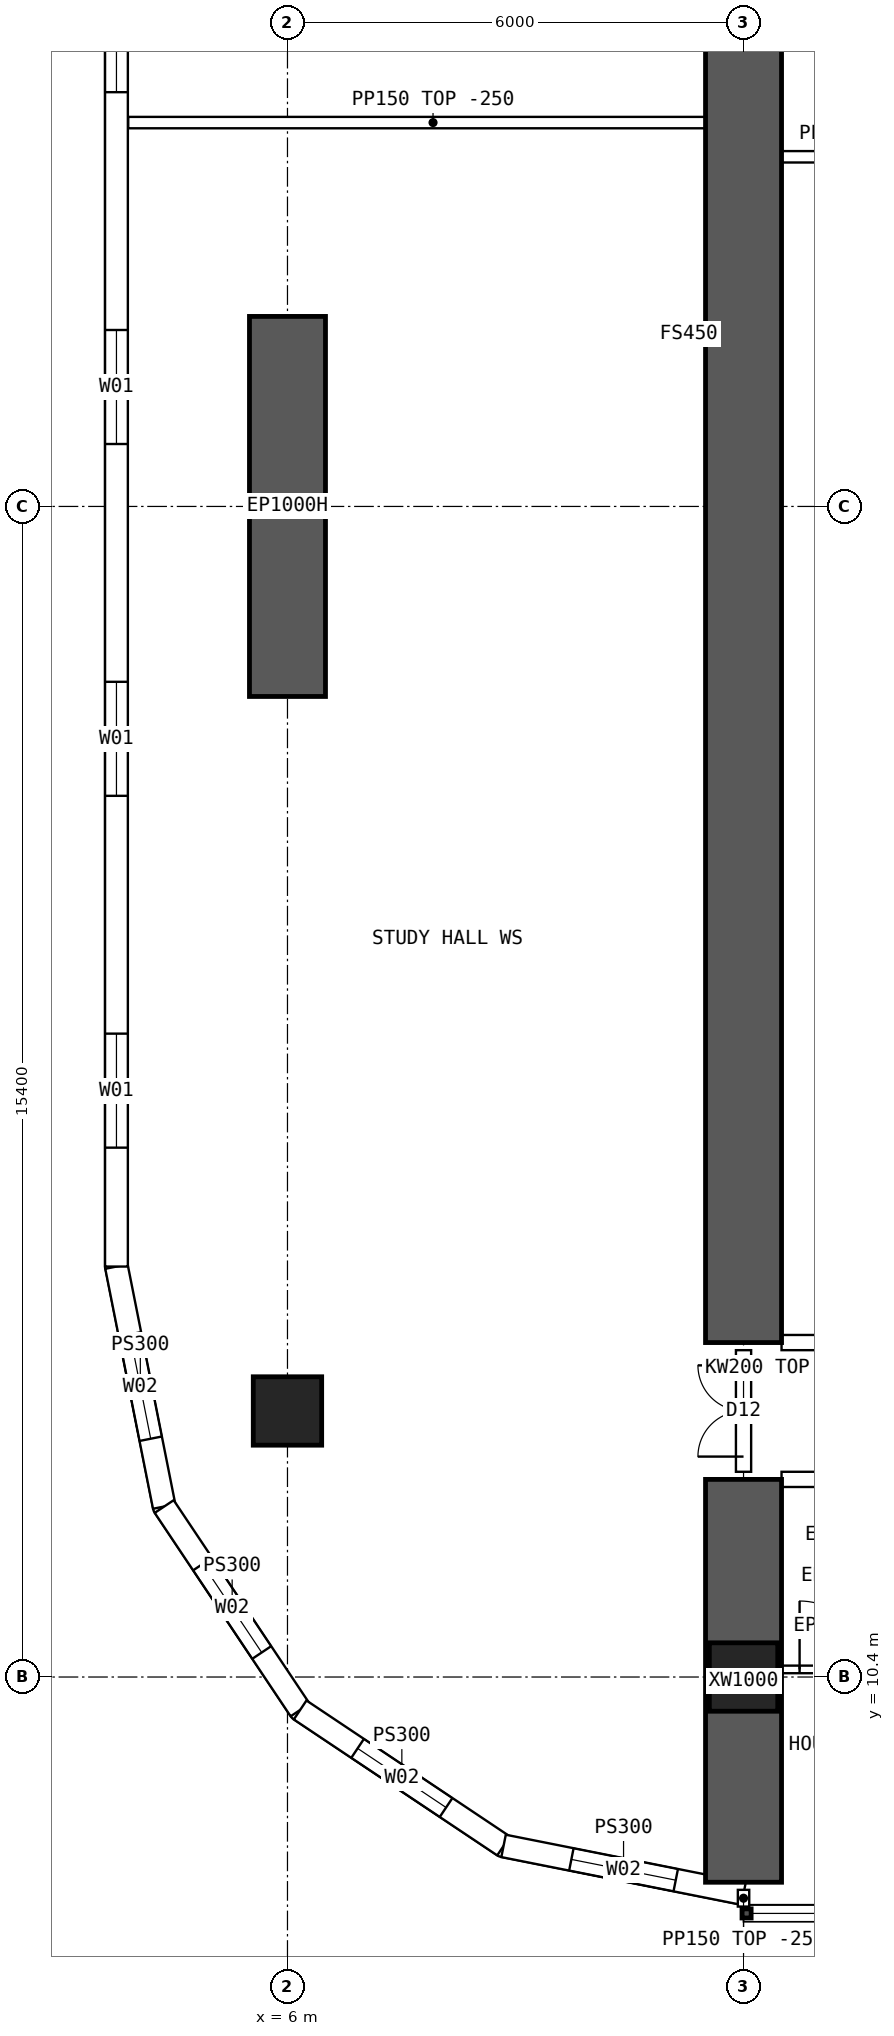
"""IFC4 building model, lengths in metres.
Left out: names, types, materials, properties, quantities, classifications, styles, units other than length and angle.
Written with IfcOpenShell. Run it as: python <this file> out.ifc"""

import sys

from ifc_helpers import new_model, si_unit, direction, frame, frame_2d, origin, origin_2d, place, context, subcontext, project, spatial, polyline, rectangle, hollow_rectangle, outline, extrude, element, fill, save


model = new_model("IFC4")
c1 = context("Model", 3, precision=1e-05, world=origin(), true_north=direction((0.0, 1.0)))
c2 = subcontext(c1, "Body", "Model", "MODEL_VIEW")
j1 = project(units=[si_unit("LENGTHUNIT", "METRE"), si_unit("PLANEANGLEUNIT", "RADIAN")], contexts=[c1])
p1 = place(None, origin())
s1 = spatial("IfcSite", under=j1, at=p1, CompositionType="ELEMENT")
p2 = place(p1, origin())
s2 = spatial("IfcBuilding", under=s1, at=p2, CompositionType="ELEMENT")
p3 = place(p2, frame((0.0, 0.0, 23.95)))
s3 = spatial("IfcBuildingStorey", under=s2, at=p3, CompositionType="ELEMENT", Elevation=23.95)
for number, where, z_axis, x_axis in (
    (1, (12.0, 10.4, 0.0), (0.0, 0.0, 1.0), (1.0, 0.0, 0.0)),
    (2, (6.0, 13.9, 0.0), (0.0, 0.0, 1.0), (1.0, 0.0, 0.0)),
):
    element("IfcColumn", number, at=place(p3, frame(where, z_axis=z_axis, x_axis=x_axis)), inside=s3, PredefinedType="COLUMN", context=c2, shape_type="SweptSolid", body=[
        extrude(hollow_rectangle(XDim=0.9, YDim=0.9, WallThickness=0.09, at=origin_2d()), origin(), (0.0, 0.0, 1.0), 3.75),
    ])
p4 = place(p3, frame((6.0, 23.3, 0.0), z_axis=(0.0, 0.0, 1.0), x_axis=(0.0, 1.0, 0.0)))
e3 = element("IfcWall", 3, at=p4, inside=s3, PredefinedType="SHEAR", context=c2, shape_type="SweptSolid", body=[
    extrude(rectangle(XDim=5.0, YDim=1.0, at=frame_2d((2.5, 0.0))), origin(), (0.0, 0.0, 1.0), 3.75),
])
p5 = place(p3, frame((12.0, 7.7, 0.0), z_axis=(0.0, 0.0, 1.0), x_axis=(0.0, 1.0, 0.0)))
e4 = element("IfcWall", 4, at=p5, inside=s3, PredefinedType="SHEAR", context=c2, shape_type="SweptSolid", body=[
    extrude(rectangle(XDim=5.3, YDim=1.0, at=frame_2d((2.65, 0.0))), origin(), (0.0, 0.0, 1.0), 3.75),
])
p6 = place(p3, frame((12.0, 14.8, 0.0), z_axis=(0.0, 0.0, 1.0), x_axis=(0.0, 1.0, 0.0)))
e5 = element("IfcWall", 5, at=p6, inside=s3, PredefinedType="SHEAR", context=c2, shape_type="SweptSolid", body=[
    extrude(rectangle(XDim=34.4, YDim=1.0, at=frame_2d((17.2, 0.0))), origin(), (0.0, 0.0, 1.0), 3.75),
])
p7 = place(p3, frame((3.75, 48.2, 0.0), z_axis=(0.0, 0.0, 1.0), x_axis=(0.0, -1.0, 0.0)))
e6 = element("IfcWall", 6, at=p7, inside=s3, PredefinedType="SOLIDWALL", context=c2, shape_type="SweptSolid", body=[
    extrude(outline(polyline([(-0.015, -0.15), (32.415, -0.15), (32.385, 0.15), (0.015, 0.15), (-0.015, -0.15)])), origin(), (0.0, 0.0, 1.0), 3.5),
])
p8 = place(p7, frame((1.564, 0.0, 0.9)))
e7 = element("IfcOpeningElement", 7, at=p8, cuts=e6, PredefinedType="OPENING", context=c2, shape_type="SweptSolid", body=[
    extrude(rectangle(XDim=1.5, YDim=2.0, at=frame_2d((0.75, 1.0))), frame((0.0, 0.16, 0.0), z_axis=(0.0, -1.0, 0.0), x_axis=(1.0, 0.0, 0.0)), (0.0, 0.0, 1.0), 0.32),
])
p9 = place(p7, frame((6.193, 0.0, 0.9)))
e8 = element("IfcOpeningElement", 8, at=p9, cuts=e6, PredefinedType="OPENING", context=c2, shape_type="SweptSolid", body=[
    extrude(rectangle(XDim=1.5, YDim=2.0, at=frame_2d((0.75, 1.0))), frame((0.0, 0.16, 0.0), z_axis=(0.0, -1.0, 0.0), x_axis=(1.0, 0.0, 0.0)), (0.0, 0.0, 1.0), 0.32),
])
p10 = place(p7, frame((10.822, 0.0, 0.9)))
e9 = element("IfcOpeningElement", 9, at=p10, cuts=e6, PredefinedType="OPENING", context=c2, shape_type="SweptSolid", body=[
    extrude(rectangle(XDim=1.5, YDim=2.0, at=frame_2d((0.75, 1.0))), frame((0.0, 0.16, 0.0), z_axis=(0.0, -1.0, 0.0), x_axis=(1.0, 0.0, 0.0)), (0.0, 0.0, 1.0), 0.32),
])
p11 = place(p7, frame((15.45, 0.0, 0.9)))
e10 = element("IfcOpeningElement", 10, at=p11, cuts=e6, PredefinedType="OPENING", context=c2, shape_type="SweptSolid", body=[
    extrude(rectangle(XDim=1.5, YDim=2.0, at=frame_2d((0.75, 1.0))), frame((0.0, 0.16, 0.0), z_axis=(0.0, -1.0, 0.0), x_axis=(1.0, 0.0, 0.0)), (0.0, 0.0, 1.0), 0.32),
])
p12 = place(p7, frame((20.079, 0.0, 0.9)))
e11 = element("IfcOpeningElement", 11, at=p12, cuts=e6, PredefinedType="OPENING", context=c2, shape_type="SweptSolid", body=[
    extrude(rectangle(XDim=1.5, YDim=2.0, at=frame_2d((0.75, 1.0))), frame((0.0, 0.16, 0.0), z_axis=(0.0, -1.0, 0.0), x_axis=(1.0, 0.0, 0.0)), (0.0, 0.0, 1.0), 0.32),
])
p13 = place(p7, frame((24.707, 0.0, 0.9)))
e12 = element("IfcOpeningElement", 12, at=p13, cuts=e6, PredefinedType="OPENING", context=c2, shape_type="SweptSolid", body=[
    extrude(rectangle(XDim=1.5, YDim=2.0, at=frame_2d((0.75, 1.0))), frame((0.0, 0.16, 0.0), z_axis=(0.0, -1.0, 0.0), x_axis=(1.0, 0.0, 0.0)), (0.0, 0.0, 1.0), 0.32),
])
p14 = place(p7, frame((29.336, 0.0, 0.9)))
e13 = element("IfcOpeningElement", 13, at=p14, cuts=e6, PredefinedType="OPENING", context=c2, shape_type="SweptSolid", body=[
    extrude(rectangle(XDim=1.5, YDim=2.0, at=frame_2d((0.75, 1.0))), frame((0.0, 0.16, 0.0), z_axis=(0.0, -1.0, 0.0), x_axis=(1.0, 0.0, 0.0)), (0.0, 0.0, 1.0), 0.32),
])
p15 = place(p3, frame((3.75, 15.8, 0.0), z_axis=(0.0, 0.0, 1.0), x_axis=(0.195065901187, -0.980790137692, 0.0)))
e14 = element("IfcWall", 14, at=p15, inside=s3, PredefinedType="SOLIDWALL", context=c2, shape_type="SweptSolid", body=[
    extrude(outline(polyline([(-0.015, -0.15), (3.249, -0.15), (3.189, 0.15), (0.015, 0.15), (-0.015, -0.15)])), origin(), (0.0, 0.0, 1.0), 3.5),
])
p16 = place(p15, frame((0.909, 0.0, 0.9)))
e15 = element("IfcOpeningElement", 15, at=p16, cuts=e14, PredefinedType="OPENING", context=c2, shape_type="SweptSolid", body=[
    extrude(rectangle(XDim=1.4, YDim=1.8, at=frame_2d((0.7, 0.9))), frame((0.0, 0.16, 0.0), z_axis=(0.0, -1.0, 0.0), x_axis=(1.0, 0.0, 0.0)), (0.0, 0.0, 1.0), 0.32),
])
p17 = place(p3, frame((4.378, 12.643, 0.0), z_axis=(0.0, 0.0, 1.0), x_axis=(0.555609954424, -0.831443069936, 0.0)))
e16 = element("IfcWall", 16, at=p17, inside=s3, PredefinedType="SOLIDWALL", context=c2, shape_type="SweptSolid", body=[
    extrude(outline(polyline([(-0.03, -0.15), (3.249, -0.15), (3.189, 0.15), (0.03, 0.15), (-0.03, -0.15)])), origin(), (0.0, 0.0, 1.0), 3.5),
])
p18 = place(p17, frame((0.909, 0.0, 0.9)))
e17 = element("IfcOpeningElement", 17, at=p18, cuts=e16, PredefinedType="OPENING", context=c2, shape_type="SweptSolid", body=[
    extrude(rectangle(XDim=1.4, YDim=1.8, at=frame_2d((0.7, 0.9))), frame((0.0, 0.16, 0.0), z_axis=(0.0, -1.0, 0.0), x_axis=(1.0, 0.0, 0.0)), (0.0, 0.0, 1.0), 0.32),
])
p19 = place(p3, frame((6.167, 9.966, 0.0), z_axis=(0.0, 0.0, 1.0), x_axis=(0.831478105043, -0.555557522525, 0.0)))
e18 = element("IfcWall", 18, at=p19, inside=s3, PredefinedType="SOLIDWALL", context=c2, shape_type="SweptSolid", body=[
    extrude(outline(polyline([(-0.03, -0.15), (3.249, -0.15), (3.189, 0.15), (0.03, 0.15), (-0.03, -0.15)])), origin(), (0.0, 0.0, 1.0), 3.5),
])
p20 = place(p19, frame((0.909, 0.0, 0.9)))
e19 = element("IfcOpeningElement", 19, at=p20, cuts=e18, PredefinedType="OPENING", context=c2, shape_type="SweptSolid", body=[
    extrude(rectangle(XDim=1.4, YDim=1.8, at=frame_2d((0.7, 0.9))), frame((0.0, 0.16, 0.0), z_axis=(0.0, -1.0, 0.0), x_axis=(1.0, 0.0, 0.0)), (0.0, 0.0, 1.0), 0.32),
])
p21 = place(p3, frame((8.843, 8.178, 0.0), z_axis=(0.0, 0.0, 1.0), x_axis=(0.980787251524, -0.195080412259, 0.0)))
e20 = element("IfcWall", 20, at=p21, inside=s3, PredefinedType="SOLIDWALL", context=c2, shape_type="SweptSolid", body=[
    extrude(outline(polyline([(-0.03, -0.15), (3.249, -0.15), (3.189, 0.15), (0.03, 0.15), (-0.03, -0.15)])), origin(), (0.0, 0.0, 1.0), 3.5),
])
p22 = place(p21, frame((0.909, 0.0, 0.9)))
e21 = element("IfcOpeningElement", 21, at=p22, cuts=e20, PredefinedType="OPENING", context=c2, shape_type="SweptSolid", body=[
    extrude(rectangle(XDim=1.4, YDim=1.8, at=frame_2d((0.7, 0.9))), frame((0.0, 0.16, 0.0), z_axis=(0.0, -1.0, 0.0), x_axis=(1.0, 0.0, 0.0)), (0.0, 0.0, 1.0), 0.32),
])
p23 = place(p3, frame((12.5, 13.0, 0.0), z_axis=(0.0, 0.0, 1.0), x_axis=(1.0, 0.0, 0.0)))
e22 = element("IfcWall", 22, at=p23, inside=s3, PredefinedType="SOLIDWALL", context=c2, shape_type="SweptSolid", body=[
    extrude(outline(polyline([(0.0, 0.0), (5.0, 0.0), (5.0, 3.1), (0.0, 3.1), (0.0, 0.0)])), frame((0.0, 0.1, 0.0), z_axis=(0.0, -1.0, 0.0), x_axis=(1.0, 0.0, 0.0)), (0.0, 0.0, 1.0), 0.2),
])
p24 = place(p23, frame((1.425, 0.0, 0.0)))
e23 = element("IfcOpeningElement", 23, at=p24, cuts=e22, PredefinedType="OPENING", context=c2, shape_type="SweptSolid", body=[
    extrude(rectangle(XDim=0.9, YDim=2.1, at=frame_2d((0.45, 1.05))), frame((0.0, 0.11, 0.0), z_axis=(0.0, -1.0, 0.0), x_axis=(1.0, 0.0, 0.0)), (0.0, 0.0, 1.0), 0.22),
])
p25 = place(p23, frame((2.675, 0.0, 0.0)))
e24 = element("IfcOpeningElement", 24, at=p25, cuts=e22, PredefinedType="OPENING", context=c2, shape_type="SweptSolid", body=[
    extrude(rectangle(XDim=0.9, YDim=2.1, at=frame_2d((0.45, 1.05))), frame((0.0, 0.11, 0.0), z_axis=(0.0, -1.0, 0.0), x_axis=(1.0, 0.0, 0.0)), (0.0, 0.0, 1.0), 0.22),
])
p26 = place(p3, frame((12.5, 14.8, 0.0), z_axis=(0.0, 0.0, 1.0), x_axis=(1.0, 0.0, 0.0)))
e25 = element("IfcWall", 25, at=p26, inside=s3, PredefinedType="SOLIDWALL", context=c2, shape_type="SweptSolid", body=[
    extrude(rectangle(XDim=5.0, YDim=0.2, at=frame_2d((2.5, 0.0))), origin(), (0.0, 0.0, 1.0), 3.5),
])
p27 = place(p26, frame((3.3, 0.0, 0.0)))
e26 = element("IfcOpeningElement", 26, at=p27, cuts=e25, PredefinedType="OPENING", context=c2, shape_type="SweptSolid", body=[
    extrude(rectangle(XDim=1.6, YDim=2.1, at=frame_2d((0.8, 1.05))), frame((0.0, 0.11, 0.0), z_axis=(0.0, -1.0, 0.0), x_axis=(1.0, 0.0, 0.0)), (0.0, 0.0, 1.0), 0.22),
])
p28 = place(p3, frame((13.875, 10.5, 0.0), z_axis=(0.0, 0.0, 1.0), x_axis=(-1.0, 0.0, 0.0)))
e27 = element("IfcWall", 27, at=p28, inside=s3, PredefinedType="PARTITIONING", context=c2, shape_type="SweptSolid", body=[
    extrude(outline(polyline([(0.0, 0.0), (1.425, 0.0), (1.425, 3.1), (0.0, 3.1), (0.0, 0.0)])), frame((0.0, 0.05, 0.0), z_axis=(0.0, -1.0, 0.0), x_axis=(1.0, 0.0, 0.0)), (0.0, 0.0, 1.0), 0.1),
])
p29 = place(p28, frame((0.238, 0.0, 0.0)))
e28 = element("IfcOpeningElement", 28, at=p29, cuts=e27, PredefinedType="OPENING", context=c2, shape_type="SweptSolid", body=[
    extrude(rectangle(XDim=0.9, YDim=2.1, at=frame_2d((0.45, 1.05))), frame((0.0, 0.06, 0.0), z_axis=(0.0, -1.0, 0.0), x_axis=(1.0, 0.0, 0.0)), (0.0, 0.0, 1.0), 0.12),
])
p30 = place(p3, frame((12.0, 30.4, 0.0), z_axis=(0.0, 0.0, 1.0), x_axis=(1.0, 0.0, 0.0)))
e29 = element("IfcWall", 29, at=p30, inside=s3, PredefinedType="PARTITIONING", context=c2, shape_type="SweptSolid", body=[
    extrude(rectangle(XDim=3.6, YDim=0.15, at=frame_2d((1.8, 0.0))), origin(), (0.0, 0.0, 1.0), 3.5),
])
p31 = place(p3, frame((3.905, 30.85, 0.0), z_axis=(0.0, 0.0, 1.0), x_axis=(1.0, 0.0, 0.0)))
e30 = element("IfcWall", 30, at=p31, inside=s3, PredefinedType="PARTITIONING", context=c2, shape_type="SweptSolid", body=[
    extrude(outline(polyline([(0.0, 0.0), (8.02, 0.0), (8.02, 3.5), (2.397, 3.5), (2.395, 3.05), (1.797, 3.05), (1.795, 3.5), (0.0, 3.5), (0.0, 0.0)])), frame((0.0, 0.075, 0.0), z_axis=(0.0, -1.0, 0.0), x_axis=(1.0, 0.0, 0.0)), (0.0, 0.0, 1.0), 0.15),
])
p32 = place(p3, frame((12.0, 13.1, 0.0), z_axis=(0.0, 0.0, 1.0), x_axis=(0.0, 1.0, 0.0)))
e31 = element("IfcWall", 31, at=p32, inside=s3, PredefinedType="SOLIDWALL", context=c2, shape_type="SweptSolid", body=[
    extrude(outline(polyline([(0.0, 0.0), (1.6, 0.0), (1.6, 3.05), (0.0, 3.05), (0.0, 0.0)])), frame((0.0, 0.1, 0.0), z_axis=(0.0, -1.0, 0.0), x_axis=(1.0, 0.0, 0.0)), (0.0, 0.0, 1.0), 0.2),
])
p33 = place(p32, frame((0.2, 0.0, 0.0)))
e32 = element("IfcOpeningElement", 32, at=p33, cuts=e31, PredefinedType="OPENING", context=c2, shape_type="SweptSolid", body=[
    extrude(rectangle(XDim=1.2, YDim=2.1, at=frame_2d((0.6, 1.05))), frame((0.0, 0.11, 0.0), z_axis=(0.0, -1.0, 0.0), x_axis=(1.0, 0.0, 0.0)), (0.0, 0.0, 1.0), 0.22),
])
p34 = place(p3, frame((12.0, 7.6, 0.0), z_axis=(0.0, 0.0, 1.0), x_axis=(0.0, -1.0, 0.0)))
e33 = element("IfcWall", 33, at=p34, inside=s3, PredefinedType="PARTITIONING", context=c2, shape_type="SweptSolid", body=[
    extrude(rectangle(XDim=0.22, YDim=0.15, at=frame_2d((0.11, 0.0))), origin(), (0.0, 0.0, 1.0), 3.5),
])
p35 = place(p11, origin())
e34 = element("IfcWindow", 34, at=p35, inside=s3, PartitioningType="SINGLE_PANEL", PredefinedType="WINDOW", context=c2, shape_type="SweptSolid", body=[
    extrude(rectangle(XDim=1.5, YDim=2.0, at=frame_2d((0.75, 1.0))), frame((0.0, 0.03, 0.0), z_axis=(0.0, -1.0, 0.0), x_axis=(1.0, 0.0, 0.0)), (0.0, 0.0, 1.0), 0.06),
])
fill(e10, e34)
p36 = place(p12, origin())
e35 = element("IfcWindow", 35, at=p36, inside=s3, PartitioningType="SINGLE_PANEL", PredefinedType="WINDOW", context=c2, shape_type="SweptSolid", body=[
    extrude(rectangle(XDim=1.5, YDim=2.0, at=frame_2d((0.75, 1.0))), frame((0.0, 0.03, 0.0), z_axis=(0.0, -1.0, 0.0), x_axis=(1.0, 0.0, 0.0)), (0.0, 0.0, 1.0), 0.06),
])
fill(e11, e35)
p37 = place(p13, origin())
e36 = element("IfcWindow", 36, at=p37, inside=s3, PartitioningType="SINGLE_PANEL", PredefinedType="WINDOW", context=c2, shape_type="SweptSolid", body=[
    extrude(rectangle(XDim=1.5, YDim=2.0, at=frame_2d((0.75, 1.0))), frame((0.0, 0.03, 0.0), z_axis=(0.0, -1.0, 0.0), x_axis=(1.0, 0.0, 0.0)), (0.0, 0.0, 1.0), 0.06),
])
fill(e12, e36)
p38 = place(p14, origin())
e37 = element("IfcWindow", 37, at=p38, inside=s3, PartitioningType="SINGLE_PANEL", PredefinedType="WINDOW", context=c2, shape_type="SweptSolid", body=[
    extrude(rectangle(XDim=1.5, YDim=2.0, at=frame_2d((0.75, 1.0))), frame((0.0, 0.03, 0.0), z_axis=(0.0, -1.0, 0.0), x_axis=(1.0, 0.0, 0.0)), (0.0, 0.0, 1.0), 0.06),
])
fill(e13, e37)
p39 = place(p16, origin())
e38 = element("IfcWindow", 38, at=p39, inside=s3, PartitioningType="SINGLE_PANEL", PredefinedType="WINDOW", context=c2, shape_type="SweptSolid", body=[
    extrude(rectangle(XDim=1.4, YDim=1.8, at=frame_2d((0.7, 0.9))), frame((0.0, 0.03, 0.0), z_axis=(0.0, -1.0, 0.0), x_axis=(1.0, 0.0, 0.0)), (0.0, 0.0, 1.0), 0.06),
])
fill(e15, e38)
p40 = place(p18, origin())
e39 = element("IfcWindow", 39, at=p40, inside=s3, PartitioningType="SINGLE_PANEL", PredefinedType="WINDOW", context=c2, shape_type="SweptSolid", body=[
    extrude(rectangle(XDim=1.4, YDim=1.8, at=frame_2d((0.7, 0.9))), frame((0.0, 0.03, 0.0), z_axis=(0.0, -1.0, 0.0), x_axis=(1.0, 0.0, 0.0)), (0.0, 0.0, 1.0), 0.06),
])
fill(e17, e39)
p41 = place(p20, origin())
e40 = element("IfcWindow", 40, at=p41, inside=s3, PartitioningType="SINGLE_PANEL", PredefinedType="WINDOW", context=c2, shape_type="SweptSolid", body=[
    extrude(rectangle(XDim=1.4, YDim=1.8, at=frame_2d((0.7, 0.9))), frame((0.0, 0.03, 0.0), z_axis=(0.0, -1.0, 0.0), x_axis=(1.0, 0.0, 0.0)), (0.0, 0.0, 1.0), 0.06),
])
fill(e19, e40)
p42 = place(p22, origin())
e41 = element("IfcWindow", 41, at=p42, inside=s3, PartitioningType="SINGLE_PANEL", PredefinedType="WINDOW", context=c2, shape_type="SweptSolid", body=[
    extrude(rectangle(XDim=1.4, YDim=1.8, at=frame_2d((0.7, 0.9))), frame((0.0, 0.03, 0.0), z_axis=(0.0, -1.0, 0.0), x_axis=(1.0, 0.0, 0.0)), (0.0, 0.0, 1.0), 0.06),
])
fill(e21, e41)
p43 = place(p29, origin())
e42 = element("IfcDoor", 42, at=p43, inside=s3, OperationType="SINGLE_SWING_RIGHT", PredefinedType="DOOR", context=c2, shape_type="SweptSolid", body=[
    extrude(rectangle(XDim=0.9, YDim=2.1, at=frame_2d((0.45, 1.05))), frame((0.0, 0.025, 0.0), z_axis=(0.0, -1.0, 0.0), x_axis=(1.0, 0.0, 0.0)), (0.0, 0.0, 1.0), 0.05),
])
fill(e28, e42)
p44 = place(p33, origin())
e43 = element("IfcDoor", 43, at=p44, inside=s3, OperationType="DOUBLE_DOOR_SINGLE_SWING", PredefinedType="DOOR", context=c2, shape_type="SweptSolid", body=[
    extrude(rectangle(XDim=1.2, YDim=2.1, at=frame_2d((0.6, 1.05))), frame((0.0, 0.025, 0.0), z_axis=(0.0, -1.0, 0.0), x_axis=(1.0, 0.0, 0.0)), (0.0, 0.0, 1.0), 0.05),
])
fill(e32, e43)
save(model, sys.argv[1])
